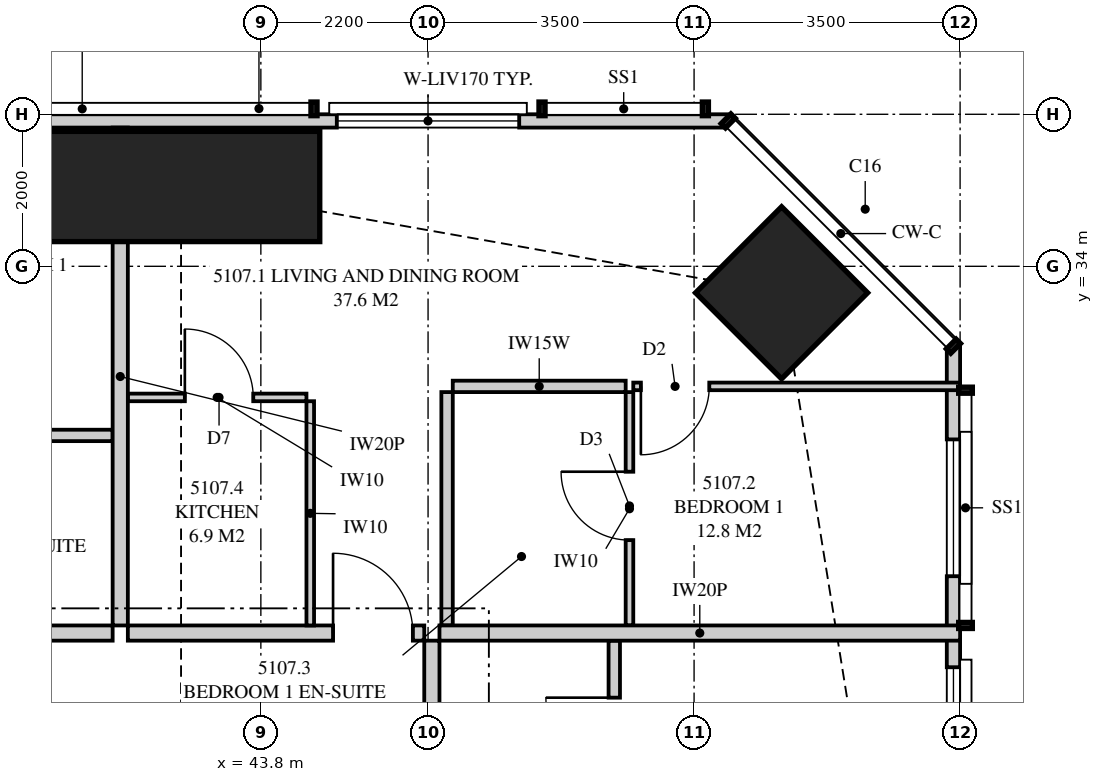
"""IFC4 building model, lengths in metres.
Left out: names, types, materials, properties, quantities, classifications, styles, units other than length and angle.
Written with IfcOpenShell. Run it as: python <this file> out.ifc"""

import sys

from ifc_helpers import new_model, si_unit, direction, frame, frame_2d, origin, origin_2d, place, context, subcontext, project, spatial, polyline, rectangle, outline, extrude, element, fill, save


model = new_model("IFC4")
c1 = context("Model", 3, precision=1e-05, world=origin(), true_north=direction((0.0, 1.0)))
c2 = subcontext(c1, "Body", "Model", "MODEL_VIEW")
j1 = project(units=[si_unit("LENGTHUNIT", "METRE"), si_unit("PLANEANGLEUNIT", "RADIAN")], contexts=[c1])
p1 = place(None, origin())
s1 = spatial("IfcSite", under=j1, at=p1, CompositionType="ELEMENT")
p2 = place(p1, origin())
s2 = spatial("IfcBuilding", under=s1, at=p2, CompositionType="ELEMENT")
p3 = place(p2, frame((0.0, 0.0, 187.85)))
s3 = spatial("IfcBuildingStorey", under=s2, at=p3, CompositionType="ELEMENT", Elevation=187.85)
p4 = place(p3, frame((50.652, 33.652, 0.0), z_axis=(0.0, 0.0, 1.0), x_axis=(0.707106781187, 0.707106781187, 0.0)))
e1 = element("IfcColumn", 1, at=p4, inside=s3, PredefinedType="COLUMN", context=c2, shape_type="SweptSolid", body=[
    extrude(rectangle(XDim=1.6, YDim=1.6, at=origin_2d()), origin(), (0.0, 0.0, 1.0), 3.35),
])
p5 = place(p3, frame((42.75, 35.05, 0.0), z_axis=(0.0, 0.0, 1.0), x_axis=(0.0, 1.0, 0.0)))
e2 = element("IfcColumn", 2, at=p5, inside=s3, PredefinedType="COLUMN", context=c2, shape_type="SweptSolid", body=[
    extrude(rectangle(XDim=1.45, YDim=3.65, at=origin_2d()), origin(), (0.0, 0.0, 1.0), 3.35),
])
p6 = place(p3, frame((52.913, 3.051, 0.0), z_axis=(0.0, 0.0, 1.0), x_axis=(0.0, 1.0, 0.0)))
e3 = element("IfcWall", 3, at=p6, inside=s3, PredefinedType="SOLIDWALL", context=c2, shape_type="SweptSolid", body=[
    extrude(outline(polyline([(0.0, 0.0), (29.897, 0.0), (29.897, 3.11), (22.167, 3.11), (22.167, 2.15), (22.074, 2.15), (22.074, 3.11), (21.949, 3.11), (21.949, 2.15), (9.949, 2.15), (9.949, 3.11), (9.847, 3.11), (9.847, 2.15), (9.706, 2.15), (9.706, 3.11), (0.0, 3.11), (0.0, 0.0)])), frame((0.0, 0.087, 0.0), z_axis=(0.0, -1.0, 0.0), x_axis=(1.0, 0.0, 0.0)), (0.0, 0.0, 1.0), 0.175),
])
p7 = place(p6, frame((1.137, 0.0, 0.4)))
e4 = element("IfcOpeningElement", 4, at=p7, cuts=e3, PredefinedType="OPENING", context=c2, shape_type="SweptSolid", body=[
    extrude(rectangle(XDim=2.4, YDim=1.7, at=frame_2d((1.2, 0.85))), frame((0.0, 0.097, 0.0), z_axis=(0.0, -1.0, 0.0), x_axis=(1.0, 0.0, 0.0)), (0.0, 0.0, 1.0), 0.195),
])
p8 = place(p6, frame((5.674, 0.0, 0.4)))
e5 = element("IfcOpeningElement", 5, at=p8, cuts=e3, PredefinedType="OPENING", context=c2, shape_type="SweptSolid", body=[
    extrude(rectangle(XDim=1.8, YDim=1.7, at=frame_2d((0.9, 0.85))), frame((0.0, 0.097, 0.0), z_axis=(0.0, -1.0, 0.0), x_axis=(1.0, 0.0, 0.0)), (0.0, 0.0, 1.0), 0.195),
])
p9 = place(p6, frame((11.902, 0.0, 0.4)))
e6 = element("IfcOpeningElement", 6, at=p9, cuts=e3, PredefinedType="OPENING", context=c2, shape_type="SweptSolid", body=[
    extrude(rectangle(XDim=2.4, YDim=1.7, at=frame_2d((1.2, 0.85))), frame((0.0, 0.097, 0.0), z_axis=(0.0, -1.0, 0.0), x_axis=(1.0, 0.0, 0.0)), (0.0, 0.0, 1.0), 0.195),
])
p10 = place(p6, frame((15.324, 0.0, 0.0)))
e7 = element("IfcOpeningElement", 7, at=p10, cuts=e3, PredefinedType="OPENING", context=c2, shape_type="SweptSolid", body=[
    extrude(rectangle(XDim=1.8, YDim=2.1, at=frame_2d((0.9, 1.05))), frame((0.0, 0.097, 0.0), z_axis=(0.0, -1.0, 0.0), x_axis=(1.0, 0.0, 0.0)), (0.0, 0.0, 1.0), 0.195),
])
p11 = place(p6, frame((23.874, 0.0, 0.4)))
e8 = element("IfcOpeningElement", 8, at=p11, cuts=e3, PredefinedType="OPENING", context=c2, shape_type="SweptSolid", body=[
    extrude(rectangle(XDim=1.8, YDim=1.7, at=frame_2d((0.9, 0.85))), frame((0.0, 0.097, 0.0), z_axis=(0.0, -1.0, 0.0), x_axis=(1.0, 0.0, 0.0)), (0.0, 0.0, 1.0), 0.195),
])
p12 = place(p6, frame((26.871, 0.0, 0.4)))
e9 = element("IfcOpeningElement", 9, at=p12, cuts=e3, PredefinedType="OPENING", context=c2, shape_type="SweptSolid", body=[
    extrude(rectangle(XDim=1.8, YDim=1.7, at=frame_2d((0.9, 0.85))), frame((0.0, 0.097, 0.0), z_axis=(0.0, -1.0, 0.0), x_axis=(1.0, 0.0, 0.0)), (0.0, 0.0, 1.0), 0.195),
])
p13 = place(p3, frame((49.949, 35.913, 0.0), z_axis=(0.0, 0.0, 1.0), x_axis=(-1.0, 0.0, 0.0)))
e10 = element("IfcWall", 10, at=p13, inside=s3, PredefinedType="SOLIDWALL", context=c2, shape_type="SweptSolid", body=[
    extrude(outline(polyline([(0.0, 0.0), (34.897, 0.0), (34.897, 3.11), (27.91, 3.11), (27.91, 2.15), (27.836, 2.15), (27.836, 3.11), (27.699, 3.11), (27.699, 2.15), (7.199, 2.15), (7.199, 3.11), (7.062, 3.11), (7.062, 2.15), (6.987, 2.15), (6.987, 3.11), (0.0, 3.11), (0.0, 0.0)])), frame((0.0, 0.087, 0.0), z_axis=(0.0, -1.0, 0.0), x_axis=(1.0, 0.0, 0.0)), (0.0, 0.0, 1.0), 0.175),
])
p14 = place(p13, frame((2.75, 0.0, 0.4)))
e11 = element("IfcOpeningElement", 11, at=p14, cuts=e10, PredefinedType="OPENING", context=c2, shape_type="SweptSolid", body=[
    extrude(rectangle(XDim=2.4, YDim=1.7, at=frame_2d((1.2, 0.85))), frame((0.0, 0.097, 0.0), z_axis=(0.0, -1.0, 0.0), x_axis=(1.0, 0.0, 0.0)), (0.0, 0.0, 1.0), 0.195),
])
p15 = place(p13, frame((9.124, 0.0, 0.4)))
e12 = element("IfcOpeningElement", 12, at=p15, cuts=e10, PredefinedType="OPENING", context=c2, shape_type="SweptSolid", body=[
    extrude(rectangle(XDim=1.8, YDim=1.7, at=frame_2d((0.9, 0.85))), frame((0.0, 0.097, 0.0), z_axis=(0.0, -1.0, 0.0), x_axis=(1.0, 0.0, 0.0)), (0.0, 0.0, 1.0), 0.195),
])
p16 = place(p13, frame((13.174, 0.0, 0.0)))
e13 = element("IfcOpeningElement", 13, at=p16, cuts=e10, PredefinedType="OPENING", context=c2, shape_type="SweptSolid", body=[
    extrude(rectangle(XDim=1.8, YDim=2.1, at=frame_2d((0.9, 1.05))), frame((0.0, 0.097, 0.0), z_axis=(0.0, -1.0, 0.0), x_axis=(1.0, 0.0, 0.0)), (0.0, 0.0, 1.0), 0.195),
])
p17 = place(p13, frame((19.849, 0.0, 0.4)))
e14 = element("IfcOpeningElement", 14, at=p17, cuts=e10, PredefinedType="OPENING", context=c2, shape_type="SweptSolid", body=[
    extrude(rectangle(XDim=1.8, YDim=1.7, at=frame_2d((0.9, 0.85))), frame((0.0, 0.097, 0.0), z_axis=(0.0, -1.0, 0.0), x_axis=(1.0, 0.0, 0.0)), (0.0, 0.0, 1.0), 0.195),
])
p18 = place(p13, frame((23.304, 0.0, 0.4)))
e15 = element("IfcOpeningElement", 15, at=p18, cuts=e10, PredefinedType="OPENING", context=c2, shape_type="SweptSolid", body=[
    extrude(rectangle(XDim=2.4, YDim=1.7, at=frame_2d((1.2, 0.85))), frame((0.0, 0.097, 0.0), z_axis=(0.0, -1.0, 0.0), x_axis=(1.0, 0.0, 0.0)), (0.0, 0.0, 1.0), 0.195),
])
p19 = place(p13, frame((30.249, 0.0, 0.4)))
e16 = element("IfcOpeningElement", 16, at=p19, cuts=e10, PredefinedType="OPENING", context=c2, shape_type="SweptSolid", body=[
    extrude(rectangle(XDim=1.8, YDim=1.7, at=frame_2d((0.9, 0.85))), frame((0.0, 0.097, 0.0), z_axis=(0.0, -1.0, 0.0), x_axis=(1.0, 0.0, 0.0)), (0.0, 0.0, 1.0), 0.195),
])
p20 = place(p3, frame((41.95, 35.825, 0.0), z_axis=(0.0, 0.0, 1.0), x_axis=(0.0, -1.0, 0.0)))
e17 = element("IfcWall", 17, at=p20, inside=s3, PredefinedType="PARTITIONING", context=c2, shape_type="SweptSolid", body=[
    extrude(outline(polyline([(0.529, 2.15), (0.0, 2.15), (0.0, 0.0), (0.529, 0.0), (0.529, 0.746), (1.021, 0.746), (1.021, 0.0), (6.55, 0.0), (6.55, 3.11), (1.685, 3.11), (1.685, 2.15), (1.021, 2.15), (1.021, 1.404), (0.529, 1.404), (0.529, 2.15)])), frame((0.0, 0.1, 0.0), z_axis=(0.0, -1.0, 0.0), x_axis=(1.0, 0.0, 0.0)), (0.0, 0.0, 1.0), 0.2),
])
p21 = place(p3, frame((38.4, 31.775, 0.0), z_axis=(0.0, 0.0, 1.0), x_axis=(1.0, 0.0, 0.0)))
e18 = element("IfcWall", 18, at=p21, inside=s3, PredefinedType="PLUMBINGWALL", context=c2, shape_type="SweptSolid", body=[
    extrude(rectangle(XDim=3.45, YDim=0.15, at=frame_2d((1.725, 0.0))), origin(), (0.0, 0.0, 1.0), 3.11),
])
p22 = place(p21, frame((0.4, 0.0, 0.0)))
e19 = element("IfcOpeningElement", 19, at=p22, cuts=e18, PredefinedType="OPENING", context=c2, shape_type="SweptSolid", body=[
    extrude(rectangle(XDim=0.9, YDim=2.1, at=frame_2d((0.45, 1.05))), frame((0.0, 0.085, 0.0), z_axis=(0.0, -1.0, 0.0), x_axis=(1.0, 0.0, 0.0)), (0.0, 0.0, 1.0), 0.17),
])
p23 = place(p3, frame((42.05, 29.175, 0.0), z_axis=(0.0, 0.0, 1.0), x_axis=(1.0, 0.0, 0.0)))
e20 = element("IfcWall", 20, at=p23, inside=s3, PredefinedType="PARTITIONING", context=c2, shape_type="SweptSolid", body=[
    extrude(outline(polyline([(0.0, 0.0), (3.9, 0.0), (3.9, 3.11), (1.037, 3.11), (1.037, 2.541), (0.363, 2.541), (0.363, 3.11), (0.0, 3.11), (0.0, 0.0)])), frame((0.0, 0.1, 0.0), z_axis=(0.0, -1.0, 0.0), x_axis=(1.0, 0.0, 0.0)), (0.0, 0.0, 1.0), 0.2),
])
p24 = place(p23, frame((2.7, 0.0, 0.0)))
e21 = element("IfcOpeningElement", 21, at=p24, cuts=e20, PredefinedType="OPENING", context=c2, shape_type="SweptSolid", body=[
    extrude(rectangle(XDim=1.05, YDim=2.2, at=frame_2d((0.525, 1.1))), frame((0.0, 0.11, 0.0), z_axis=(0.0, -1.0, 0.0), x_axis=(1.0, 0.0, 0.0)), (0.0, 0.0, 1.0), 0.22),
])
p25 = place(p3, frame((48.65, 32.345, 0.0), z_axis=(0.0, 0.0, 1.0), x_axis=(0.0, -1.0, 0.0)))
e22 = element("IfcWall", 22, at=p25, inside=s3, PredefinedType="PARTITIONING", context=c2, shape_type="SweptSolid", body=[
    extrude(rectangle(XDim=3.07, YDim=0.1, at=frame_2d((1.535, 0.0))), origin(), (0.0, 0.0, 1.0), 3.11),
])
p26 = place(p25, frame((1.048, 0.0, 0.0)))
e23 = element("IfcOpeningElement", 23, at=p26, cuts=e22, PredefinedType="OPENING", context=c2, shape_type="SweptSolid", body=[
    extrude(rectangle(XDim=0.9, YDim=2.1, at=frame_2d((0.45, 1.05))), frame((0.0, 0.06, 0.0), z_axis=(0.0, -1.0, 0.0), x_axis=(1.0, 0.0, 0.0)), (0.0, 0.0, 1.0), 0.12),
])
p27 = place(p3, frame((48.7, 32.42, 0.0), z_axis=(0.0, 0.0, 1.0), x_axis=(1.0, 0.0, 0.0)))
e24 = element("IfcWall", 24, at=p27, inside=s3, PredefinedType="PARTITIONING", context=c2, shape_type="SweptSolid", body=[
    extrude(outline(polyline([(0.0, 0.0), (4.3, 0.0), (4.3, 3.11), (3.022, 3.11), (3.022, 2.15), (1.279, 2.15), (1.279, 3.11), (0.0, 3.11), (0.0, 0.0)])), frame((0.0, 0.05, 0.0), z_axis=(0.0, -1.0, 0.0), x_axis=(1.0, 0.0, 0.0)), (0.0, 0.0, 1.0), 0.1),
])
p28 = place(p27, frame((0.1, 0.0, 0.0)))
e25 = element("IfcOpeningElement", 25, at=p28, cuts=e24, PredefinedType="OPENING", context=c2, shape_type="SweptSolid", body=[
    extrude(rectangle(XDim=0.9, YDim=2.1, at=frame_2d((0.45, 1.05))), frame((0.0, 0.06, 0.0), z_axis=(0.0, -1.0, 0.0), x_axis=(1.0, 0.0, 0.0)), (0.0, 0.0, 1.0), 0.12),
])
p29 = place(p3, frame((46.325, 32.42, 0.0), z_axis=(0.0, 0.0, 1.0), x_axis=(1.0, 0.0, 0.0)))
e26 = element("IfcWall", 26, at=p29, inside=s3, PredefinedType="PLUMBINGWALL", context=c2, shape_type="SweptSolid", body=[
    extrude(rectangle(XDim=2.275, YDim=0.15, at=frame_2d((1.138, 0.0))), origin(), (0.0, 0.0, 1.0), 3.11),
])
p30 = place(p3, frame((46.25, 32.345, 0.0), z_axis=(0.0, 0.0, 1.0), x_axis=(0.0, -1.0, 0.0)))
e27 = element("IfcWall", 27, at=p30, inside=s3, PredefinedType="PLUMBINGWALL", context=c2, shape_type="SweptSolid", body=[
    extrude(rectangle(XDim=3.07, YDim=0.15, at=frame_2d((1.535, 0.0))), origin(), (0.0, 0.0, 1.0), 3.11),
])
p31 = place(p3, frame((42.05, 32.275, 0.0), z_axis=(0.0, 0.0, 1.0), x_axis=(1.0, 0.0, 0.0)))
e28 = element("IfcWall", 28, at=p31, inside=s3, PredefinedType="PARTITIONING", context=c2, shape_type="SweptSolid", body=[
    extrude(outline(polyline([(0.0, 0.0), (2.35, 0.0), (2.35, 3.11), (0.987, 3.11), (0.987, 2.541), (0.413, 2.541), (0.413, 3.11), (0.0, 3.11), (0.0, 0.0)])), frame((0.0, 0.05, 0.0), z_axis=(0.0, -1.0, 0.0), x_axis=(1.0, 0.0, 0.0)), (0.0, 0.0, 1.0), 0.1),
])
p32 = place(p31, frame((0.75, 0.0, 0.0)))
e29 = element("IfcOpeningElement", 29, at=p32, cuts=e28, PredefinedType="OPENING", context=c2, shape_type="SweptSolid", body=[
    extrude(rectangle(XDim=0.9, YDim=2.1, at=frame_2d((0.45, 1.05))), frame((0.0, 0.06, 0.0), z_axis=(0.0, -1.0, 0.0), x_axis=(1.0, 0.0, 0.0)), (0.0, 0.0, 1.0), 0.12),
])
p33 = place(p3, frame((44.45, 32.225, 0.0), z_axis=(0.0, 0.0, 1.0), x_axis=(0.0, -1.0, 0.0)))
e30 = element("IfcWall", 30, at=p33, inside=s3, PredefinedType="PARTITIONING", context=c2, shape_type="SweptSolid", body=[
    extrude(rectangle(XDim=2.95, YDim=0.1, at=frame_2d((1.475, 0.0))), origin(), (0.0, 0.0, 1.0), 3.11),
])
p34 = place(p3, frame((46.15, 29.175, 0.0), z_axis=(0.0, 0.0, 1.0), x_axis=(1.0, 0.0, 0.0)))
e31 = element("IfcWall", 31, at=p34, inside=s3, PredefinedType="PARTITIONING", context=c2, shape_type="SweptSolid", body=[
    extrude(outline(polyline([(0.0, 0.0), (6.85, 0.0), (6.85, 3.11), (6.147, 3.11), (6.147, 2.15), (4.303, 2.15), (4.303, 3.11), (0.0, 3.11), (0.0, 0.0)])), frame((0.0, 0.1, 0.0), z_axis=(0.0, -1.0, 0.0), x_axis=(1.0, 0.0, 0.0)), (0.0, 0.0, 1.0), 0.2),
])
p35 = place(p3, frame((48.45, 26.65, 0.0), z_axis=(0.0, 0.0, 1.0), x_axis=(0.0, 1.0, 0.0)))
e32 = element("IfcWall", 32, at=p35, inside=s3, PredefinedType="PLUMBINGWALL", context=c2, shape_type="SweptSolid", body=[
    extrude(rectangle(XDim=2.425, YDim=0.15, at=frame_2d((1.212, 0.0))), origin(), (0.0, 0.0, 1.0), 3.11),
])
p36 = place(p35, frame((0.775, 0.0, 0.0)))
e33 = element("IfcOpeningElement", 33, at=p36, cuts=e32, PredefinedType="OPENING", context=c2, shape_type="SweptSolid", body=[
    extrude(rectangle(XDim=0.9, YDim=2.1, at=frame_2d((0.45, 1.05))), frame((0.0, 0.085, 0.0), z_axis=(0.0, -1.0, 0.0), x_axis=(1.0, 0.0, 0.0)), (0.0, 0.0, 1.0), 0.17),
])
p37 = place(p3, frame((37.875, 29.175, 0.0), z_axis=(0.0, 0.0, 1.0), x_axis=(1.0, 0.0, 0.0)))
e34 = element("IfcWall", 34, at=p37, inside=s3, PredefinedType="PARTITIONING", context=c2, shape_type="SweptSolid", body=[
    extrude(rectangle(XDim=3.975, YDim=0.2, at=frame_2d((1.988, 0.0))), origin(), (0.0, 0.0, 1.0), 3.11),
])
p38 = place(p3, frame((46.05, 26.488, 0.0), z_axis=(0.0, 0.0, 1.0), x_axis=(0.0, 1.0, 0.0)))
e35 = element("IfcWall", 35, at=p38, inside=s3, PredefinedType="PARTITIONING", context=c2, shape_type="SweptSolid", body=[
    extrude(rectangle(XDim=2.587, YDim=0.2, at=frame_2d((1.294, 0.0))), origin(), (0.0, 0.0, 1.0), 3.11),
])
p39 = place(p11, origin())
e36 = element("IfcWindow", 36, at=p39, inside=s3, PartitioningType="SINGLE_PANEL", PredefinedType="WINDOW", context=c2, shape_type="SweptSolid", body=[
    extrude(rectangle(XDim=1.8, YDim=1.7, at=frame_2d((0.9, 0.85))), frame((0.0, 0.03, 0.0), z_axis=(0.0, -1.0, 0.0), x_axis=(1.0, 0.0, 0.0)), (0.0, 0.0, 1.0), 0.06),
])
fill(e8, e36)
p40 = place(p12, origin())
e37 = element("IfcWindow", 37, at=p40, inside=s3, PartitioningType="SINGLE_PANEL", PredefinedType="WINDOW", context=c2, shape_type="SweptSolid", body=[
    extrude(rectangle(XDim=1.8, YDim=1.7, at=frame_2d((0.9, 0.85))), frame((0.0, 0.03, 0.0), z_axis=(0.0, -1.0, 0.0), x_axis=(1.0, 0.0, 0.0)), (0.0, 0.0, 1.0), 0.06),
])
fill(e9, e37)
p41 = place(p14, origin())
e38 = element("IfcWindow", 38, at=p41, inside=s3, PartitioningType="SINGLE_PANEL", PredefinedType="WINDOW", context=c2, shape_type="SweptSolid", body=[
    extrude(rectangle(XDim=2.4, YDim=1.7, at=frame_2d((1.2, 0.85))), frame((0.0, 0.03, 0.0), z_axis=(0.0, -1.0, 0.0), x_axis=(1.0, 0.0, 0.0)), (0.0, 0.0, 1.0), 0.06),
])
fill(e11, e38)
p42 = place(p24, origin())
e39 = element("IfcDoor", 39, at=p42, inside=s3, OperationType="SINGLE_SWING_LEFT", PredefinedType="DOOR", context=c2, shape_type="SweptSolid", body=[
    extrude(rectangle(XDim=1.05, YDim=2.2, at=frame_2d((0.525, 1.1))), frame((0.0, 0.025, 0.0), z_axis=(0.0, -1.0, 0.0), x_axis=(1.0, 0.0, 0.0)), (0.0, 0.0, 1.0), 0.05),
])
fill(e21, e39)
p43 = place(p28, frame((0.9, 0.0, 0.0), z_axis=(0.0, 0.0, 1.0), x_axis=(-1.0, 0.0, 0.0)))
e40 = element("IfcDoor", 40, at=p43, inside=s3, OperationType="SINGLE_SWING_RIGHT", PredefinedType="DOOR", context=c2, shape_type="SweptSolid", body=[
    extrude(rectangle(XDim=0.9, YDim=2.1, at=frame_2d((0.45, 1.05))), frame((0.0, 0.025, 0.0), z_axis=(0.0, -1.0, 0.0), x_axis=(1.0, 0.0, 0.0)), (0.0, 0.0, 1.0), 0.05),
])
fill(e25, e40)
p44 = place(p26, frame((0.9, 0.0, 0.0), z_axis=(0.0, 0.0, 1.0), x_axis=(-1.0, 0.0, 0.0)))
e41 = element("IfcDoor", 41, at=p44, inside=s3, OperationType="SINGLE_SWING_RIGHT", PredefinedType="DOOR", context=c2, shape_type="SweptSolid", body=[
    extrude(rectangle(XDim=0.9, YDim=2.1, at=frame_2d((0.45, 1.05))), frame((0.0, 0.025, 0.0), z_axis=(0.0, -1.0, 0.0), x_axis=(1.0, 0.0, 0.0)), (0.0, 0.0, 1.0), 0.05),
])
fill(e23, e41)
p45 = place(p32, origin())
e42 = element("IfcDoor", 42, at=p45, inside=s3, OperationType="SINGLE_SWING_LEFT", PredefinedType="DOOR", context=c2, shape_type="SweptSolid", body=[
    extrude(rectangle(XDim=0.9, YDim=2.1, at=frame_2d((0.45, 1.05))), frame((0.0, 0.025, 0.0), z_axis=(0.0, -1.0, 0.0), x_axis=(1.0, 0.0, 0.0)), (0.0, 0.0, 1.0), 0.05),
])
fill(e29, e42)
p46 = place(p36, origin())
e43 = element("IfcDoor", 43, at=p46, inside=s3, OperationType="SINGLE_SWING_RIGHT", PredefinedType="DOOR", context=c2, shape_type="SweptSolid", body=[
    extrude(rectangle(XDim=0.9, YDim=2.1, at=frame_2d((0.45, 1.05))), frame((0.0, 0.025, 0.0), z_axis=(0.0, -1.0, 0.0), x_axis=(1.0, 0.0, 0.0)), (0.0, 0.0, 1.0), 0.05),
])
fill(e33, e43)
save(model, sys.argv[1])
